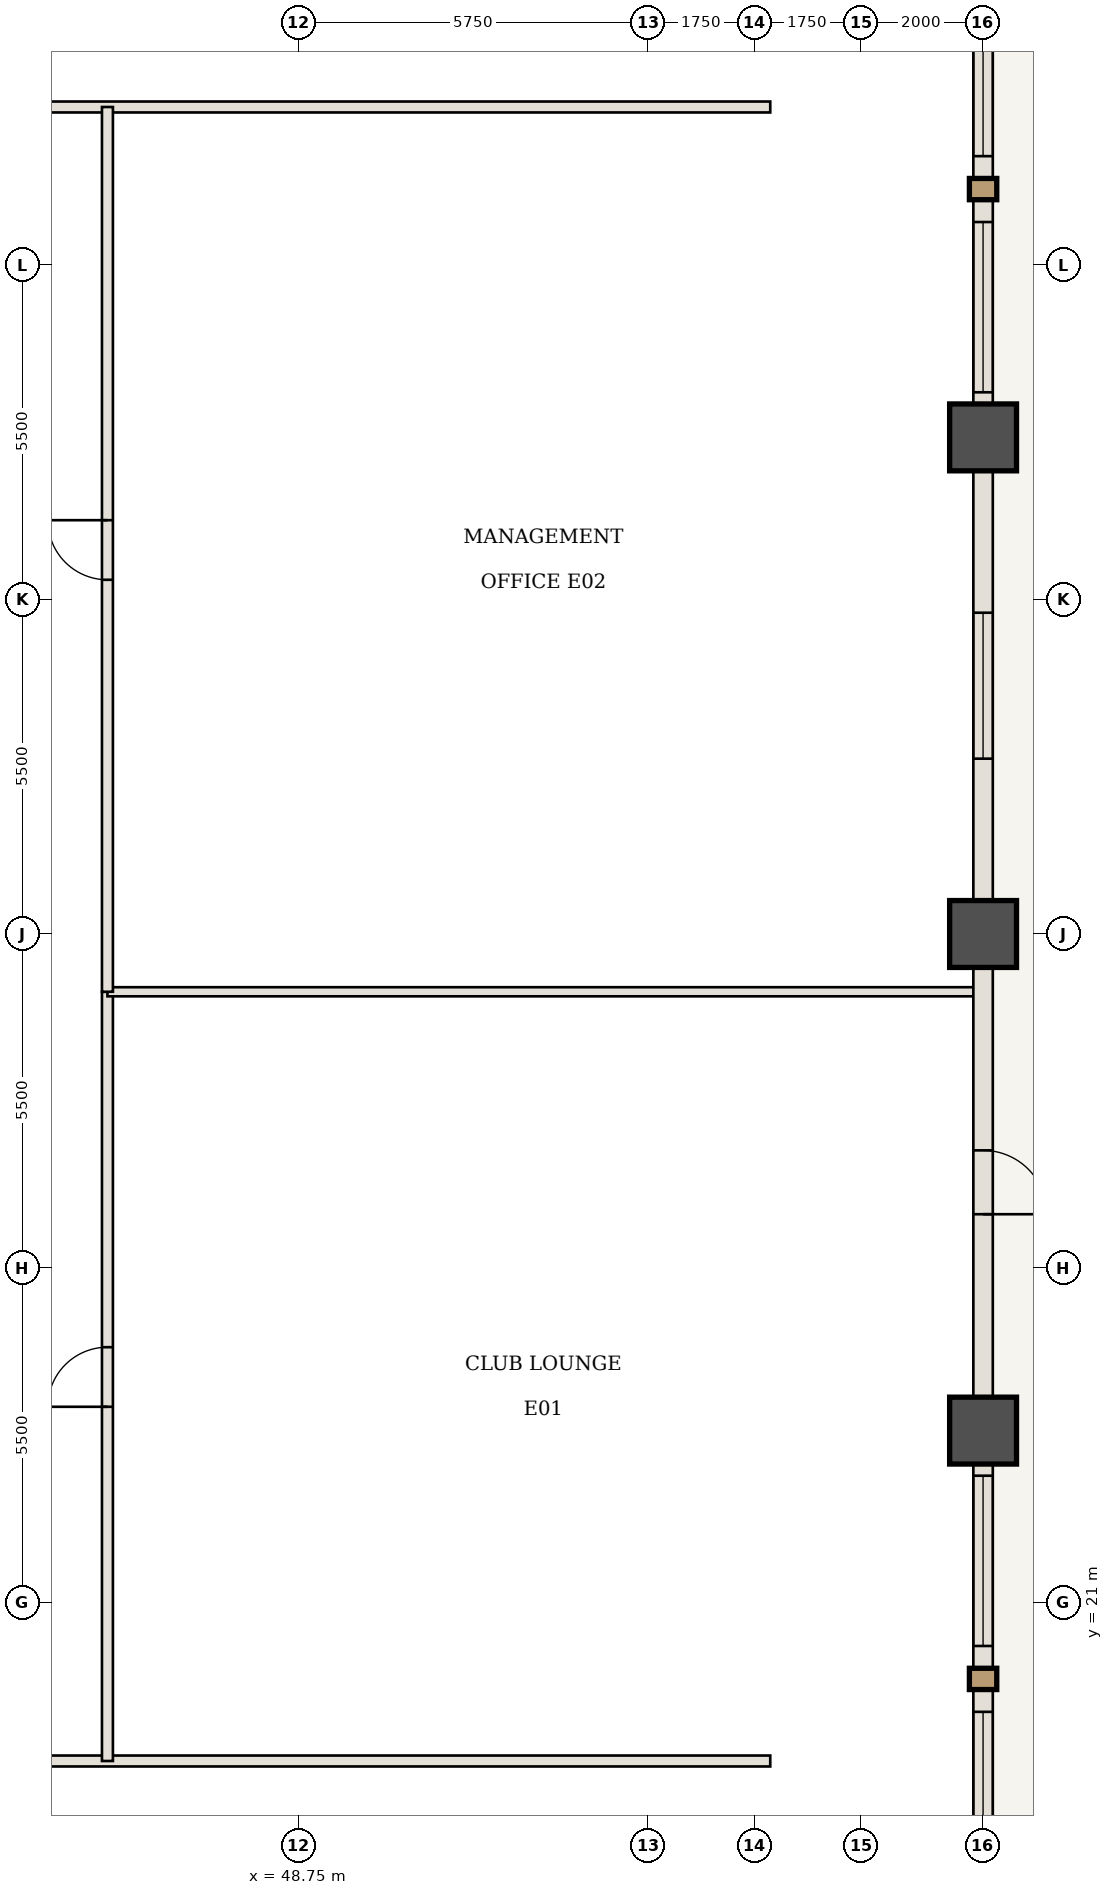
"""IFC4 building model, lengths in metres.
Left out: names, types, materials, properties, quantities, classifications, styles, units other than length and angle.
Written with IfcOpenShell. Run it as: python <this file> out.ifc"""

import sys

from ifc_helpers import new_model, si_unit, direction, frame, frame_2d, origin, origin_2d, place, context, subcontext, project, spatial, rectangle, extrude, element, fill, save


model = new_model("IFC4")
c1 = context("Model", 3, precision=1e-05, world=origin(), true_north=direction((0.0, 1.0)))
c2 = subcontext(c1, "Body", "Model", "MODEL_VIEW")
j1 = project(units=[si_unit("LENGTHUNIT", "METRE"), si_unit("PLANEANGLEUNIT", "RADIAN")], contexts=[c1])
p1 = place(None, origin())
s1 = spatial("IfcSite", under=j1, at=p1, CompositionType="ELEMENT")
p2 = place(p1, origin())
s2 = spatial("IfcBuilding", under=s1, at=p2, CompositionType="ELEMENT")
p3 = place(p2, frame((0.0, 0.0, 34.3)))
s3 = spatial("IfcBuildingStorey", under=s2, at=p3, CompositionType="ELEMENT", Elevation=34.3)
for number, where, z_axis, x_axis in (
    (1, (60.0, 23.833, -0.42), (0.0, 0.0, 1.0), (1.0, 0.0, 0.0)),
    (2, (60.0, 32.0, -0.42), (0.0, 0.0, 1.0), (1.0, 0.0, 0.0)),
    (3, (60.0, 40.167, -0.42), (0.0, 0.0, 1.0), (1.0, 0.0, 0.0)),
):
    element("IfcColumn", number, at=place(p3, frame(where, z_axis=z_axis, x_axis=x_axis)), inside=s3, PredefinedType="COLUMN", context=c2, shape_type="SweptSolid", body=[
        extrude(rectangle(XDim=1.1, YDim=1.1, at=origin_2d()), origin(), (0.0, 0.0, 1.0), 4.97),
    ])
p4 = place(p3, frame((40.917, 18.4, 0.0), z_axis=(0.0, 0.0, 1.0), x_axis=(1.0, 0.0, 0.0)))
e4 = element("IfcWall", 4, at=p4, inside=s3, PredefinedType="STANDARD", context=c2, shape_type="SweptSolid", body=[
    extrude(rectangle(XDim=15.583, YDim=0.18, at=frame_2d((7.792, 0.0))), origin(), (0.0, 0.0, 1.0), 4.13),
])
p5 = place(p4, frame((1.817, 0.0, 0.0)))
e5 = element("IfcOpeningElement", 5, at=p5, cuts=e4, PredefinedType="OPENING", context=c2, shape_type="SweptSolid", body=[
    extrude(rectangle(XDim=0.98, YDim=2.2, at=frame_2d((0.49, 1.1))), frame((0.0, 0.1, 0.0), z_axis=(0.0, -1.0, 0.0), x_axis=(1.0, 0.0, 0.0)), (0.0, 0.0, 1.0), 0.2),
])
p6 = place(p3, frame((31.05, 45.6, 0.0), z_axis=(0.0, 0.0, 1.0), x_axis=(1.0, 0.0, 0.0)))
e6 = element("IfcWall", 6, at=p6, inside=s3, PredefinedType="STANDARD", context=c2, shape_type="SweptSolid", body=[
    extrude(rectangle(XDim=25.45, YDim=0.18, at=frame_2d((12.725, 0.0))), origin(), (0.0, 0.0, 1.0), 4.13),
])
p7 = place(p6, frame((6.75, 0.0, 0.0)))
e7 = element("IfcOpeningElement", 7, at=p7, cuts=e6, PredefinedType="OPENING", context=c2, shape_type="SweptSolid", body=[
    extrude(rectangle(XDim=0.98, YDim=2.2, at=frame_2d((0.49, 1.1))), frame((0.0, 0.1, 0.0), z_axis=(0.0, -1.0, 0.0), x_axis=(1.0, 0.0, 0.0)), (0.0, 0.0, 1.0), 0.2),
])
p8 = place(p3, frame((45.6, 18.4, 0.0), z_axis=(0.0, 0.0, 1.0), x_axis=(0.0, 1.0, 0.0)))
e8 = element("IfcWall", 8, at=p8, inside=s3, PredefinedType="STANDARD", context=c2, shape_type="SweptSolid", body=[
    extrude(rectangle(XDim=12.65, YDim=0.18, at=frame_2d((6.325, 0.0))), origin(), (0.0, 0.0, 1.0), 4.13),
])
p9 = place(p8, frame((5.825, 0.0, 0.0)))
e9 = element("IfcOpeningElement", 9, at=p9, cuts=e8, PredefinedType="OPENING", context=c2, shape_type="SweptSolid", body=[
    extrude(rectangle(XDim=0.98, YDim=2.2, at=frame_2d((0.49, 1.1))), frame((0.0, 0.1, 0.0), z_axis=(0.0, -1.0, 0.0), x_axis=(1.0, 0.0, 0.0)), (0.0, 0.0, 1.0), 0.2),
])
p10 = place(p3, frame((45.6, 31.05, 0.0), z_axis=(0.0, 0.0, 1.0), x_axis=(1.0, 0.0, 0.0)))
e10 = element("IfcWall", 10, at=p10, inside=s3, PredefinedType="STANDARD", context=c2, shape_type="SweptSolid", body=[
    extrude(rectangle(XDim=14.34, YDim=0.15, at=frame_2d((7.17, 0.0))), origin(), (0.0, 0.0, 1.0), 4.13),
])
p11 = place(p3, frame((45.6, 31.05, 0.0), z_axis=(0.0, 0.0, 1.0), x_axis=(0.0, 1.0, 0.0)))
e11 = element("IfcWall", 11, at=p11, inside=s3, PredefinedType="STANDARD", context=c2, shape_type="SweptSolid", body=[
    extrude(rectangle(XDim=14.55, YDim=0.18, at=frame_2d((7.275, 0.0))), origin(), (0.0, 0.0, 1.0), 4.13),
])
p12 = place(p11, frame((6.775, 0.0, 0.0)))
e12 = element("IfcOpeningElement", 12, at=p12, cuts=e11, PredefinedType="OPENING", context=c2, shape_type="SweptSolid", body=[
    extrude(rectangle(XDim=0.98, YDim=2.2, at=frame_2d((0.49, 1.1))), frame((0.0, 0.1, 0.0), z_axis=(0.0, -1.0, 0.0), x_axis=(1.0, 0.0, 0.0)), (0.0, 0.0, 1.0), 0.2),
])
p13 = place(p3, frame((60.0, 23.833, 0.0), z_axis=(0.0, 0.0, 1.0), x_axis=(0.0, -1.0, 0.0)))
e13 = element("IfcWall", 13, at=p13, inside=s3, PredefinedType="USERDEFINED", context=c2, shape_type="SweptSolid", body=[
    extrude(rectangle(XDim=8.167, YDim=0.32, at=frame_2d((4.083, 0.0))), origin(), (0.0, 0.0, 1.0), 3.33),
])
p14 = place(p13, frame((0.742, 0.0, 0.85)))
e14 = element("IfcOpeningElement", 14, at=p14, cuts=e13, PredefinedType="OPENING", context=c2, shape_type="SweptSolid", body=[
    extrude(rectangle(XDim=2.8, YDim=2.05, at=frame_2d((1.4, 1.025))), frame((0.0, 0.17, 0.0), z_axis=(0.0, -1.0, 0.0), x_axis=(1.0, 0.0, 0.0)), (0.0, 0.0, 1.0), 0.34),
])
p15 = place(p13, frame((4.625, 0.0, 0.85)))
e15 = element("IfcOpeningElement", 15, at=p15, cuts=e13, PredefinedType="OPENING", context=c2, shape_type="SweptSolid", body=[
    extrude(rectangle(XDim=2.8, YDim=2.05, at=frame_2d((1.4, 1.025))), frame((0.0, 0.17, 0.0), z_axis=(0.0, -1.0, 0.0), x_axis=(1.0, 0.0, 0.0)), (0.0, 0.0, 1.0), 0.34),
])
p16 = place(p3, frame((60.0, 32.0, 0.0), z_axis=(0.0, 0.0, 1.0), x_axis=(0.0, -1.0, 0.0)))
e16 = element("IfcWall", 16, at=p16, inside=s3, PredefinedType="USERDEFINED", context=c2, shape_type="SweptSolid", body=[
    extrude(rectangle(XDim=8.167, YDim=0.32, at=frame_2d((4.083, 0.0))), origin(), (0.0, 0.0, 1.0), 3.33),
])
p17 = place(p16, frame((3.558, 0.0, 0.0)))
e17 = element("IfcOpeningElement", 17, at=p17, cuts=e16, PredefinedType="OPENING", context=c2, shape_type="SweptSolid", body=[
    extrude(rectangle(XDim=1.05, YDim=2.2, at=frame_2d((0.525, 1.1))), frame((0.0, 0.17, 0.0), z_axis=(0.0, -1.0, 0.0), x_axis=(1.0, 0.0, 0.0)), (0.0, 0.0, 1.0), 0.34),
])
p18 = place(p3, frame((60.0, 40.167, 0.0), z_axis=(0.0, 0.0, 1.0), x_axis=(0.0, -1.0, 0.0)))
e18 = element("IfcWall", 18, at=p18, inside=s3, PredefinedType="USERDEFINED", context=c2, shape_type="SweptSolid", body=[
    extrude(rectangle(XDim=8.167, YDim=0.32, at=frame_2d((4.083, 0.0))), origin(), (0.0, 0.0, 1.0), 3.33),
])
p19 = place(p18, frame((2.883, 0.0, 0.85)))
e19 = element("IfcOpeningElement", 19, at=p19, cuts=e18, PredefinedType="OPENING", context=c2, shape_type="SweptSolid", body=[
    extrude(rectangle(XDim=2.4, YDim=1.95, at=frame_2d((1.2, 0.975))), frame((0.0, 0.17, 0.0), z_axis=(0.0, -1.0, 0.0), x_axis=(1.0, 0.0, 0.0)), (0.0, 0.0, 1.0), 0.34),
])
p20 = place(p3, frame((60.0, 48.333, 0.0), z_axis=(0.0, 0.0, 1.0), x_axis=(0.0, -1.0, 0.0)))
e20 = element("IfcWall", 20, at=p20, inside=s3, PredefinedType="USERDEFINED", context=c2, shape_type="SweptSolid", body=[
    extrude(rectangle(XDim=8.167, YDim=0.32, at=frame_2d((4.083, 0.0))), origin(), (0.0, 0.0, 1.0), 3.33),
])
p21 = place(p20, frame((0.742, 0.0, 0.85)))
e21 = element("IfcOpeningElement", 21, at=p21, cuts=e20, PredefinedType="OPENING", context=c2, shape_type="SweptSolid", body=[
    extrude(rectangle(XDim=2.8, YDim=2.05, at=frame_2d((1.4, 1.025))), frame((0.0, 0.17, 0.0), z_axis=(0.0, -1.0, 0.0), x_axis=(1.0, 0.0, 0.0)), (0.0, 0.0, 1.0), 0.34),
])
p22 = place(p20, frame((4.625, 0.0, 0.85)))
e22 = element("IfcOpeningElement", 22, at=p22, cuts=e20, PredefinedType="OPENING", context=c2, shape_type="SweptSolid", body=[
    extrude(rectangle(XDim=2.8, YDim=2.05, at=frame_2d((1.4, 1.025))), frame((0.0, 0.17, 0.0), z_axis=(0.0, -1.0, 0.0), x_axis=(1.0, 0.0, 0.0)), (0.0, 0.0, 1.0), 0.34),
])
p23 = place(p9, origin())
e23 = element("IfcDoor", 23, at=p23, inside=s3, OperationType="SINGLE_SWING_LEFT", PredefinedType="DOOR", context=c2, shape_type="SweptSolid", body=[
    extrude(rectangle(XDim=0.98, YDim=2.2, at=frame_2d((0.49, 1.1))), frame((0.0, 0.025, 0.0), z_axis=(0.0, -1.0, 0.0), x_axis=(1.0, 0.0, 0.0)), (0.0, 0.0, 1.0), 0.05),
])
fill(e9, e23)
p24 = place(p12, origin())
e24 = element("IfcDoor", 24, at=p24, inside=s3, OperationType="SINGLE_SWING_RIGHT", PredefinedType="DOOR", context=c2, shape_type="SweptSolid", body=[
    extrude(rectangle(XDim=0.98, YDim=2.2, at=frame_2d((0.49, 1.1))), frame((0.0, 0.025, 0.0), z_axis=(0.0, -1.0, 0.0), x_axis=(1.0, 0.0, 0.0)), (0.0, 0.0, 1.0), 0.05),
])
fill(e12, e24)
p25 = place(p14, origin())
e25 = element("IfcWindow", 25, at=p25, inside=s3, PartitioningType="SINGLE_PANEL", PredefinedType="WINDOW", context=c2, shape_type="SweptSolid", body=[
    extrude(rectangle(XDim=2.8, YDim=2.05, at=frame_2d((1.4, 1.025))), frame((0.0, 0.03, 0.0), z_axis=(0.0, -1.0, 0.0), x_axis=(1.0, 0.0, 0.0)), (0.0, 0.0, 1.0), 0.06),
])
fill(e14, e25)
p26 = place(p15, origin())
e26 = element("IfcWindow", 26, at=p26, inside=s3, PartitioningType="SINGLE_PANEL", PredefinedType="WINDOW", context=c2, shape_type="SweptSolid", body=[
    extrude(rectangle(XDim=2.8, YDim=2.05, at=frame_2d((1.4, 1.025))), frame((0.0, 0.03, 0.0), z_axis=(0.0, -1.0, 0.0), x_axis=(1.0, 0.0, 0.0)), (0.0, 0.0, 1.0), 0.06),
])
fill(e15, e26)
p27 = place(p17, origin())
e27 = element("IfcDoor", 27, at=p27, inside=s3, OperationType="SINGLE_SWING_RIGHT", PredefinedType="DOOR", context=c2, shape_type="SweptSolid", body=[
    extrude(rectangle(XDim=1.05, YDim=2.2, at=frame_2d((0.525, 1.1))), frame((0.0, 0.025, 0.0), z_axis=(0.0, -1.0, 0.0), x_axis=(1.0, 0.0, 0.0)), (0.0, 0.0, 1.0), 0.05),
])
fill(e17, e27)
p28 = place(p19, origin())
e28 = element("IfcWindow", 28, at=p28, inside=s3, PartitioningType="SINGLE_PANEL", PredefinedType="WINDOW", context=c2, shape_type="SweptSolid", body=[
    extrude(rectangle(XDim=2.4, YDim=1.95, at=frame_2d((1.2, 0.975))), frame((0.0, 0.03, 0.0), z_axis=(0.0, -1.0, 0.0), x_axis=(1.0, 0.0, 0.0)), (0.0, 0.0, 1.0), 0.06),
])
fill(e19, e28)
p29 = place(p21, origin())
e29 = element("IfcWindow", 29, at=p29, inside=s3, PartitioningType="SINGLE_PANEL", PredefinedType="WINDOW", context=c2, shape_type="SweptSolid", body=[
    extrude(rectangle(XDim=2.8, YDim=2.05, at=frame_2d((1.4, 1.025))), frame((0.0, 0.03, 0.0), z_axis=(0.0, -1.0, 0.0), x_axis=(1.0, 0.0, 0.0)), (0.0, 0.0, 1.0), 0.06),
])
fill(e21, e29)
p30 = place(p22, origin())
e30 = element("IfcWindow", 30, at=p30, inside=s3, PartitioningType="SINGLE_PANEL", PredefinedType="WINDOW", context=c2, shape_type="SweptSolid", body=[
    extrude(rectangle(XDim=2.8, YDim=2.05, at=frame_2d((1.4, 1.025))), frame((0.0, 0.03, 0.0), z_axis=(0.0, -1.0, 0.0), x_axis=(1.0, 0.0, 0.0)), (0.0, 0.0, 1.0), 0.06),
])
fill(e22, e30)
save(model, sys.argv[1])
